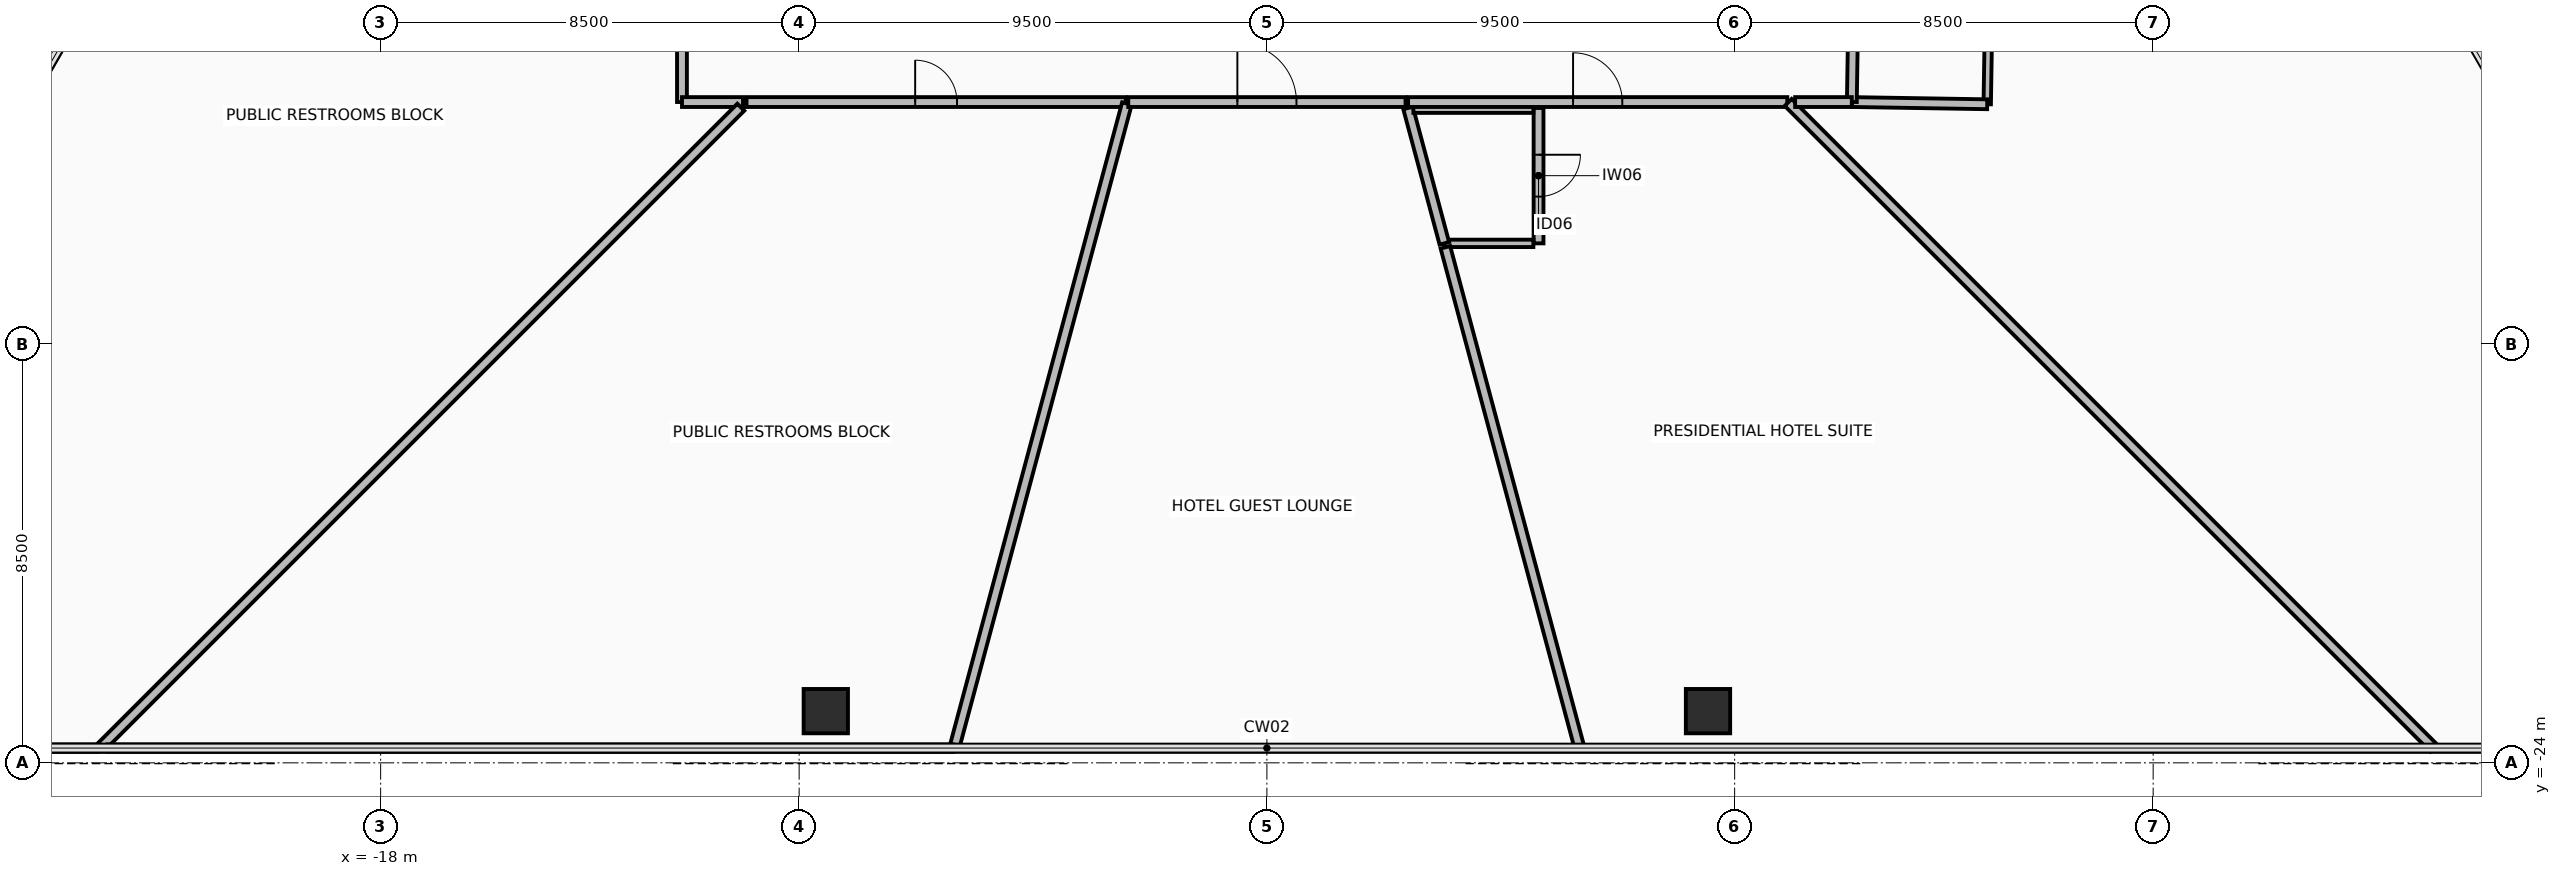
"""IFC4 building model, lengths in metres.
Left out: names, types, materials, properties, quantities, classifications, styles, units other than length and angle.
Written with IfcOpenShell. Run it as: python <this file> out.ifc"""

import sys

from ifc_helpers import new_model, si_unit, direction, frame, frame_2d, origin, origin_2d, place, context, subcontext, project, spatial, rectangle, hollow_rectangle, extrude, element, fill, save


model = new_model("IFC4")
c1 = context("Model", 3, precision=1e-05, world=origin(), true_north=direction((0.0, 1.0)))
c2 = subcontext(c1, "Body", "Model", "MODEL_VIEW")
j1 = project(units=[si_unit("LENGTHUNIT", "METRE"), si_unit("PLANEANGLEUNIT", "RADIAN")], contexts=[c1])
p1 = place(None, origin())
s1 = spatial("IfcSite", under=j1, at=p1, CompositionType="ELEMENT")
p2 = place(p1, origin())
s2 = spatial("IfcBuilding", under=s1, at=p2, CompositionType="ELEMENT")
p3 = place(p2, frame((0.0, 0.0, 48.85)))
s3 = spatial("IfcBuildingStorey", under=s2, at=p3, CompositionType="ELEMENT", Elevation=48.85)
for number, where, z_axis, x_axis in (
    (1, (-8.959, -22.95, 0.0), (0.0, 0.0, 1.0), (1.0, 0.0, 0.0)),
    (2, (8.959, -22.95, 0.0), (0.0, 0.0, 1.0), (1.0, 0.0, 0.0)),
):
    element("IfcColumn", number, at=place(p3, frame(where, z_axis=z_axis, x_axis=x_axis)), inside=s3, PredefinedType="COLUMN", context=c2, shape_type="SweptSolid", body=[
        extrude(hollow_rectangle(XDim=0.9, YDim=0.9, WallThickness=0.05, at=origin_2d()), origin(), (0.0, 0.0, 1.0), 3.4),
    ])
p4 = place(p3, frame((5.517, -10.7, 0.0), z_axis=(0.0, 0.0, 1.0), x_axis=(0.0, -1.0, 0.0)))
e3 = element("IfcWall", 3, at=p4, inside=s3, PredefinedType="PARTITIONING", context=c2, shape_type="SweptSolid", body=[
    extrude(rectangle(XDim=2.75, YDim=0.2, at=frame_2d((1.375, 0.0))), origin(), (0.0, 0.0, 1.0), 3.225),
])
p5 = place(p4, frame((0.95, 0.0, 0.0)))
e4 = element("IfcOpeningElement", 4, at=p5, cuts=e3, PredefinedType="OPENING", context=c2, shape_type="SweptSolid", body=[
    extrude(rectangle(XDim=0.85, YDim=2.1, at=frame_2d((0.425, 1.05))), frame((0.0, 0.11, 0.0), z_axis=(0.0, -1.0, 0.0), x_axis=(1.0, 0.0, 0.0)), (0.0, 0.0, 1.0), 0.22),
])
p6 = place(p3, frame((5.412, -13.45, 0.0), z_axis=(0.0, 0.0, 1.0), x_axis=(-1.0, 0.0, 0.0)))
e5 = element("IfcWall", 5, at=p6, inside=s3, PredefinedType="PARTITIONING", context=c2, shape_type="SweptSolid", body=[
    extrude(rectangle(XDim=1.808, YDim=0.15, at=frame_2d((0.904, 0.0))), origin(), (0.0, 0.0, 1.0), 3.225),
])
p7 = place(p3, frame((3.604, -13.45, 0.0), z_axis=(0.0, 0.0, 1.0), x_axis=(-0.258804667121, 0.965929678743, 0.0)))
e6 = element("IfcWall", 6, at=p7, inside=s3, PredefinedType="PARTITIONING", context=c2, shape_type="SweptSolid", body=[
    extrude(rectangle(XDim=2.847, YDim=0.2, at=frame_2d((1.423, 0.0))), origin(), (0.0, 0.0, 1.0), 3.225),
])
p8 = place(p3, frame((2.976, -10.7, 0.0), z_axis=(0.0, 0.0, 1.0), x_axis=(1.0, 0.0, 0.0)))
e7 = element("IfcWall", 7, at=p8, inside=s3, PredefinedType="PARTITIONING", context=c2, shape_type="SweptSolid", body=[
    extrude(rectangle(XDim=2.436, YDim=0.2, at=frame_2d((1.218, 0.0))), origin(), (0.0, 0.0, 1.0), 3.225),
])
p9 = place(p3, frame((14.671, -8.08, 0.0), z_axis=(0.0, 0.0, 1.0), x_axis=(-0.016307914507, -0.99986701712, 0.0)))
e8 = element("IfcWall", 8, at=p9, inside=s3, PredefinedType="PARTITIONING", context=c2, shape_type="SweptSolid", body=[
    extrude(rectangle(XDim=2.545, YDim=0.15, at=frame_2d((1.272, 0.0))), origin(), (0.0, 0.0, 1.0), 2.62),
])
p10 = place(p3, frame((14.63, -10.625, 0.0), z_axis=(0.0, 0.0, 1.0), x_axis=(-0.999868029143, 0.016245747077, 0.0)))
e9 = element("IfcWall", 9, at=p10, inside=s3, PredefinedType="PARTITIONING", context=c2, shape_type="SweptSolid", body=[
    extrude(rectangle(XDim=2.75, YDim=0.2, at=frame_2d((1.375, 0.0))), origin(), (0.0, 0.0, 1.0), 2.62),
])
p11 = place(p3, frame((11.88, -10.578, 0.0), z_axis=(0.0, 0.0, 1.0), x_axis=(0.016318711927, 0.999866840955, 0.0)))
e10 = element("IfcWall", 10, at=p11, inside=s3, PredefinedType="PARTITIONING", context=c2, shape_type="SweptSolid", body=[
    extrude(rectangle(XDim=2.648, YDim=0.2, at=frame_2d((1.324, 0.0))), origin(), (0.0, 0.0, 1.0), 2.62),
])
p12 = place(p3, frame((-30.366, -19.596, 0.0), z_axis=(0.0, 0.0, 1.0), x_axis=(0.499991293932, 0.866030430177, 0.0)))
e11 = element("IfcWall", 11, at=p12, inside=s3, PredefinedType="PARTITIONING", context=c2, shape_type="SweptSolid", body=[
    extrude(rectangle(XDim=15.643, YDim=0.15, at=frame_2d((7.822, 0.0))), origin(), (0.0, 0.0, 1.0), 3.225),
])
p13 = place(p3, frame((-11.88, -3.216, 0.0), z_axis=(0.0, 0.0, 1.0), x_axis=(0.0, -1.0, 0.0)))
e12 = element("IfcWall", 12, at=p13, inside=s3, PredefinedType="PARTITIONING", context=c2, shape_type="SweptSolid", body=[
    extrude(rectangle(XDim=7.364, YDim=0.2, at=frame_2d((3.682, 0.0))), origin(), (0.0, 0.0, 1.0), 2.62),
])
p14 = place(p13, frame((3.257, 0.0, 0.0)))
e13 = element("IfcOpeningElement", 13, at=p14, cuts=e12, PredefinedType="OPENING", context=c2, shape_type="SweptSolid", body=[
    extrude(rectangle(XDim=0.85, YDim=2.1, at=frame_2d((0.425, 1.05))), frame((0.0, 0.11, 0.0), z_axis=(0.0, -1.0, 0.0), x_axis=(1.0, 0.0, 0.0)), (0.0, 0.0, 1.0), 0.22),
])
p15 = place(p3, frame((-11.879, -10.58, 0.0), z_axis=(0.0, 0.0, 1.0), x_axis=(1.0, 0.0, 0.0)))
e14 = element("IfcWall", 14, at=p15, inside=s3, PredefinedType="PARTITIONING", context=c2, shape_type="SweptSolid", body=[
    extrude(rectangle(XDim=1.239, YDim=0.2, at=frame_2d((0.62, 0.0))), origin(), (0.0, 0.0, 1.0), 3.225),
])
p16 = place(p3, frame((-10.685, -10.685, 0.0), z_axis=(0.0, 0.0, 1.0), x_axis=(-0.707106781187, -0.707106781187, 0.0)))
e15 = element("IfcWall", 15, at=p16, inside=s3, PredefinedType="PARTITIONING", context=c2, shape_type="SweptSolid", body=[
    extrude(rectangle(XDim=18.396, YDim=0.2, at=frame_2d((9.198, 0.0))), origin(), (0.0, 0.0, 1.0), 2.42),
])
p17 = place(p3, frame((-23.71, -23.7, 0.0), z_axis=(0.0, 0.0, 1.0), x_axis=(-1.0, 0.0, 0.0)))
e16 = element("IfcWall", 16, at=p17, inside=s3, PredefinedType="PARTITIONING", context=c2, shape_type="SweptSolid", body=[
    extrude(rectangle(XDim=4.286, YDim=0.15, at=frame_2d((2.143, 0.0))), origin(), (0.0, 0.0, 1.0), 3.225),
])
p18 = place(p3, frame((-10.57, -10.58, 0.0), z_axis=(0.0, 0.0, 1.0), x_axis=(1.0, 0.0, 0.0)))
e17 = element("IfcWall", 17, at=p18, inside=s3, PredefinedType="PARTITIONING", context=c2, shape_type="SweptSolid", body=[
    extrude(rectangle(XDim=7.702, YDim=0.2, at=frame_2d((3.851, 0.0))), origin(), (0.0, 0.0, 1.0), 2.62),
])
p19 = place(p18, frame((3.426, 0.0, 0.0)))
e18 = element("IfcOpeningElement", 18, at=p19, cuts=e17, PredefinedType="OPENING", context=c2, shape_type="SweptSolid", body=[
    extrude(rectangle(XDim=0.85, YDim=2.1, at=frame_2d((0.425, 1.05))), frame((0.0, 0.11, 0.0), z_axis=(0.0, -1.0, 0.0), x_axis=(1.0, 0.0, 0.0)), (0.0, 0.0, 1.0), 0.22),
])
p20 = place(p3, frame((-2.843, -10.612, 0.0), z_axis=(0.0, 0.0, 1.0), x_axis=(-0.25882927933, -0.965923083978, 0.0)))
e19 = element("IfcWall", 19, at=p20, inside=s3, PredefinedType="PARTITIONING", context=c2, shape_type="SweptSolid", body=[
    extrude(rectangle(XDim=13.531, YDim=0.2, at=frame_2d((6.766, 0.0))), origin(), (0.0, 0.0, 1.0), 2.42),
])
p21 = place(p3, frame((-6.37, -23.7, 0.0), z_axis=(0.0, 0.0, 1.0), x_axis=(-1.0, 0.0, 0.0)))
e20 = element("IfcWall", 20, at=p21, inside=s3, PredefinedType="PARTITIONING", context=c2, shape_type="SweptSolid", body=[
    extrude(rectangle(XDim=17.182, YDim=0.15, at=frame_2d((8.591, 0.0))), origin(), (0.0, 0.0, 1.0), 3.225),
])
p22 = place(p3, frame((-2.816, -10.58, 0.0), z_axis=(0.0, 0.0, 1.0), x_axis=(1.0, 0.0, 0.0)))
e21 = element("IfcWall", 21, at=p22, inside=s3, PredefinedType="PARTITIONING", context=c2, shape_type="SweptSolid", body=[
    extrude(rectangle(XDim=5.631, YDim=0.2, at=frame_2d((2.816, 0.0))), origin(), (0.0, 0.0, 1.0), 3.225),
])
p23 = place(p22, frame((2.216, 0.0, 0.0)))
e22 = element("IfcOpeningElement", 22, at=p23, cuts=e21, PredefinedType="OPENING", context=c2, shape_type="SweptSolid", body=[
    extrude(rectangle(XDim=1.2, YDim=2.15, at=frame_2d((0.6, 1.075))), frame((0.0, 0.11, 0.0), z_axis=(0.0, -1.0, 0.0), x_axis=(1.0, 0.0, 0.0)), (0.0, 0.0, 1.0), 0.22),
])
p24 = place(p3, frame((3.625, -13.53, 0.0), z_axis=(0.0, 0.0, 1.0), x_axis=(0.258804083219, -0.96592983519, 0.0)))
e23 = element("IfcWall", 23, at=p24, inside=s3, PredefinedType="PARTITIONING", context=c2, shape_type="SweptSolid", body=[
    extrude(rectangle(XDim=10.529, YDim=0.2, at=frame_2d((5.264, 0.0))), origin(), (0.0, 0.0, 1.0), 2.42),
])
p25 = place(p3, frame((2.867, -10.58, 0.0), z_axis=(0.0, 0.0, 1.0), x_axis=(1.0, 0.0, 0.0)))
e24 = element("IfcWall", 24, at=p25, inside=s3, PredefinedType="PARTITIONING", context=c2, shape_type="SweptSolid", body=[
    extrude(rectangle(XDim=7.702, YDim=0.2, at=frame_2d((3.851, 0.0))), origin(), (0.0, 0.0, 1.0), 2.62),
])
p26 = place(p25, frame((3.351, 0.0, 0.0)))
e25 = element("IfcOpeningElement", 25, at=p26, cuts=e24, PredefinedType="OPENING", context=c2, shape_type="SweptSolid", body=[
    extrude(rectangle(XDim=1.0, YDim=2.15, at=frame_2d((0.5, 1.075))), frame((0.0, 0.11, 0.0), z_axis=(0.0, -1.0, 0.0), x_axis=(1.0, 0.0, 0.0)), (0.0, 0.0, 1.0), 0.22),
])
p27 = place(p3, frame((10.587, -10.587, 0.0), z_axis=(0.0, 0.0, 1.0), x_axis=(0.707106781187, -0.707106781187, 0.0)))
e26 = element("IfcWall", 26, at=p27, inside=s3, PredefinedType="PARTITIONING", context=c2, shape_type="SweptSolid", body=[
    extrude(rectangle(XDim=18.544, YDim=0.2, at=frame_2d((9.272, 0.0))), origin(), (0.0, 0.0, 1.0), 2.42),
])
p28 = place(p3, frame((10.729, -10.58, 0.0), z_axis=(0.0, 0.0, 1.0), x_axis=(1.0, 0.0, 0.0)))
e27 = element("IfcWall", 27, at=p28, inside=s3, PredefinedType="PARTITIONING", context=c2, shape_type="SweptSolid", body=[
    extrude(rectangle(XDim=1.151, YDim=0.2, at=frame_2d((0.575, 0.0))), origin(), (0.0, 0.0, 1.0), 3.225),
])
p29 = place(p5, origin())
e28 = element("IfcDoor", 28, at=p29, inside=s3, OperationType="SINGLE_SWING_RIGHT", PredefinedType="DOOR", context=c2, shape_type="SweptSolid", body=[
    extrude(rectangle(XDim=0.85, YDim=2.1, at=frame_2d((0.425, 1.05))), frame((0.0, 0.025, 0.0), z_axis=(0.0, -1.0, 0.0), x_axis=(1.0, 0.0, 0.0)), (0.0, 0.0, 1.0), 0.05),
])
fill(e4, e28)
p30 = place(p19, origin())
e29 = element("IfcDoor", 29, at=p30, inside=s3, OperationType="SINGLE_SWING_RIGHT", PredefinedType="DOOR", context=c2, shape_type="SweptSolid", body=[
    extrude(rectangle(XDim=0.85, YDim=2.1, at=frame_2d((0.425, 1.05))), frame((0.0, 0.025, 0.0), z_axis=(0.0, -1.0, 0.0), x_axis=(1.0, 0.0, 0.0)), (0.0, 0.0, 1.0), 0.05),
])
fill(e18, e29)
p31 = place(p23, origin())
e30 = element("IfcDoor", 30, at=p31, inside=s3, OperationType="SINGLE_SWING_LEFT", PredefinedType="DOOR", context=c2, shape_type="SweptSolid", body=[
    extrude(rectangle(XDim=1.2, YDim=2.15, at=frame_2d((0.6, 1.075))), frame((0.0, 0.025, 0.0), z_axis=(0.0, -1.0, 0.0), x_axis=(1.0, 0.0, 0.0)), (0.0, 0.0, 1.0), 0.05),
])
fill(e22, e30)
p32 = place(p26, origin())
e31 = element("IfcDoor", 31, at=p32, inside=s3, OperationType="SINGLE_SWING_LEFT", PredefinedType="DOOR", context=c2, shape_type="SweptSolid", body=[
    extrude(rectangle(XDim=1.0, YDim=2.15, at=frame_2d((0.5, 1.075))), frame((0.0, 0.025, 0.0), z_axis=(0.0, -1.0, 0.0), x_axis=(1.0, 0.0, 0.0)), (0.0, 0.0, 1.0), 0.05),
])
fill(e25, e31)
save(model, sys.argv[1])
